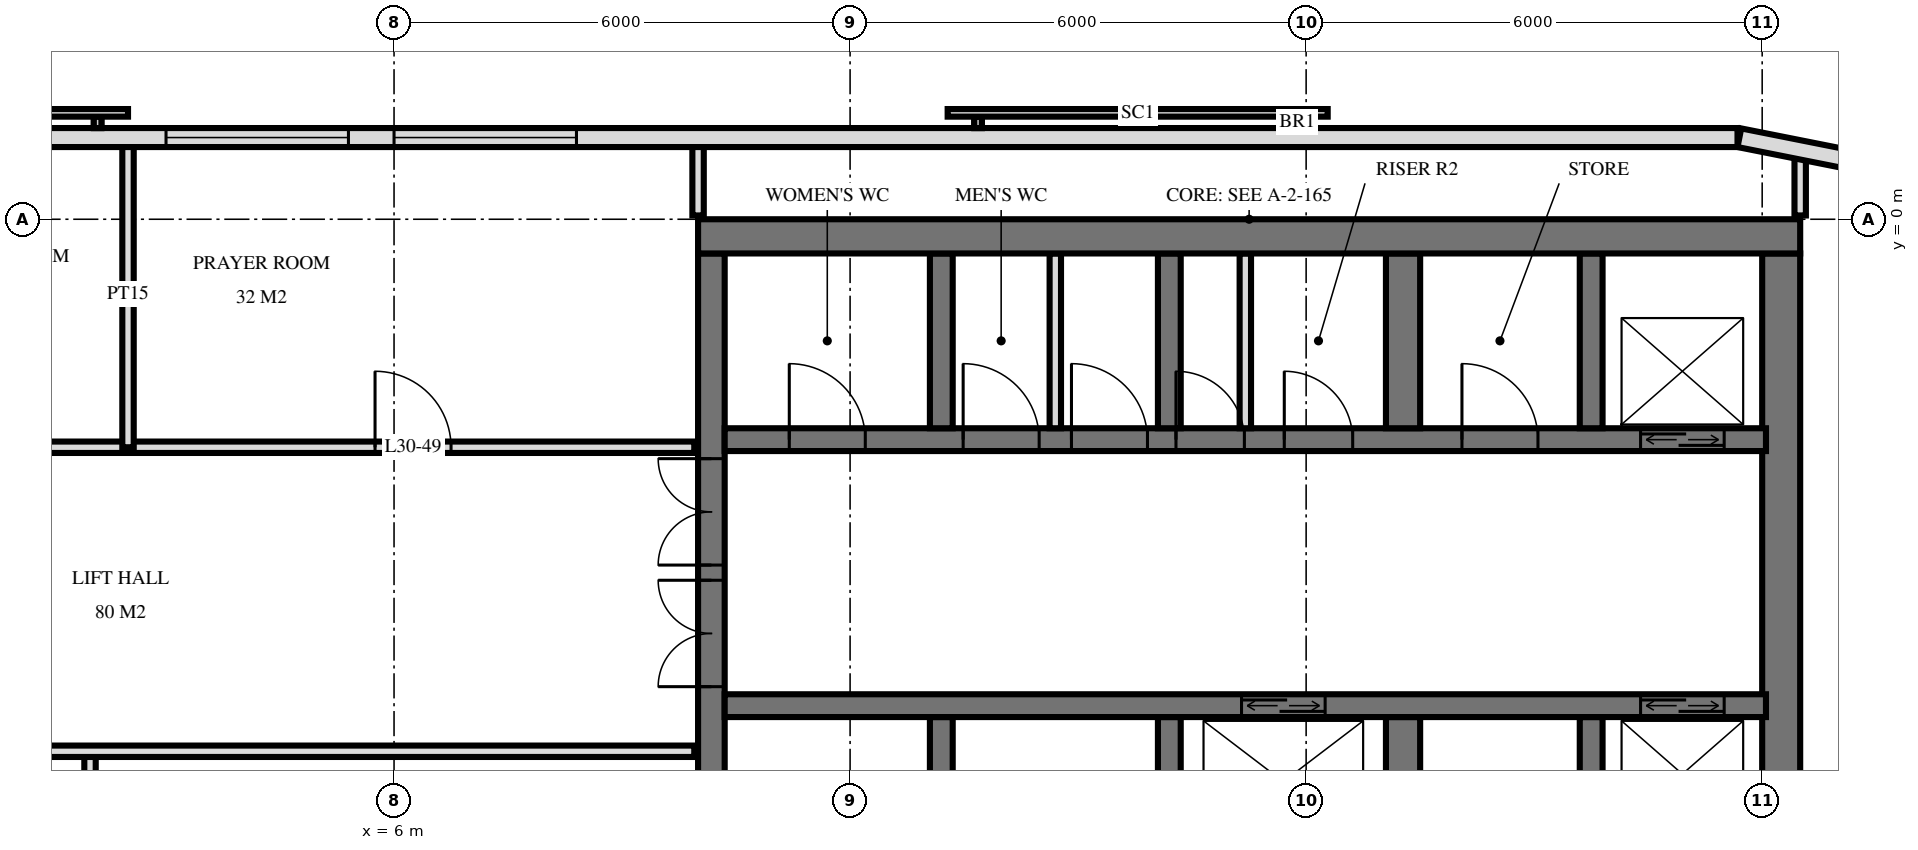
"""IFC4 building model, lengths in metres.
Left out: names, types, materials, properties, quantities, classifications, styles, units other than length and angle.
Written with IfcOpenShell. Run it as: python <this file> out.ifc"""

import sys

from ifc_helpers import new_model, si_unit, direction, frame, frame_2d, origin, place, context, subcontext, project, spatial, rectangle, extrude, element, fill, save


model = new_model("IFC4")
c1 = context("Model", 3, precision=1e-05, world=origin(), true_north=direction((0.0, 1.0)))
c2 = subcontext(c1, "Body", "Model", "MODEL_VIEW")
j1 = project(units=[si_unit("LENGTHUNIT", "METRE"), si_unit("PLANEANGLEUNIT", "RADIAN")], contexts=[c1])
p1 = place(None, origin())
s1 = spatial("IfcSite", under=j1, at=p1, CompositionType="ELEMENT")
p2 = place(p1, origin())
s2 = spatial("IfcBuilding", under=s1, at=p2, CompositionType="ELEMENT")
p3 = place(p2, frame((0.0, 0.0, 120.0)))
s3 = spatial("IfcBuildingStorey", under=s2, at=p3, CompositionType="ELEMENT", Elevation=120.0)
p4 = place(p3, frame((10.0, -0.225, 0.0), z_axis=(0.0, 0.0, 1.0), x_axis=(1.0, 0.0, 0.0)))
e1 = element("IfcWall", 1, at=p4, inside=s3, PredefinedType="SHEAR", context=c2, shape_type="SweptSolid", body=[
    extrude(rectangle(XDim=14.5, YDim=0.45, at=frame_2d((7.25, 0.0))), origin(), (0.0, 0.0, 1.0), 3.6),
])
p5 = place(p3, frame((10.175, -14.55, 0.0), z_axis=(0.0, 0.0, 1.0), x_axis=(0.0, 1.0, 0.0)))
e2 = element("IfcWall", 2, at=p5, inside=s3, PredefinedType="SHEAR", context=c2, shape_type="SweptSolid", body=[
    extrude(rectangle(XDim=14.1, YDim=0.35, at=frame_2d((7.05, 0.0))), origin(), (0.0, 0.0, 1.0), 3.6),
])
p6 = place(p5, frame((8.4, 0.0, 0.0)))
e3 = element("IfcOpeningElement", 3, at=p6, cuts=e2, PredefinedType="OPENING", context=c2, shape_type="SweptSolid", body=[
    extrude(rectangle(XDim=1.4, YDim=2.4, at=frame_2d((0.7, 1.2))), frame((0.0, 0.185, 0.0), z_axis=(0.0, -1.0, 0.0), x_axis=(1.0, 0.0, 0.0)), (0.0, 0.0, 1.0), 0.37),
])
p7 = place(p5, frame((10.0, 0.0, 0.0)))
e4 = element("IfcOpeningElement", 4, at=p7, cuts=e2, PredefinedType="OPENING", context=c2, shape_type="SweptSolid", body=[
    extrude(rectangle(XDim=1.4, YDim=2.4, at=frame_2d((0.7, 1.2))), frame((0.0, 0.185, 0.0), z_axis=(0.0, -1.0, 0.0), x_axis=(1.0, 0.0, 0.0)), (0.0, 0.0, 1.0), 0.37),
])
p8 = place(p5, frame((4.0, 0.0, 0.0)))
e5 = element("IfcOpeningElement", 5, at=p8, cuts=e2, PredefinedType="OPENING", context=c2, shape_type="SweptSolid", body=[
    extrude(rectangle(XDim=1.2, YDim=2.1, at=frame_2d((0.6, 1.05))), frame((0.0, 0.185, 0.0), z_axis=(0.0, -1.0, 0.0), x_axis=(1.0, 0.0, 0.0)), (0.0, 0.0, 1.0), 0.37),
])
p9 = place(p3, frame((24.25, -14.55, 0.0), z_axis=(0.0, 0.0, 1.0), x_axis=(0.0, 1.0, 0.0)))
e6 = element("IfcWall", 6, at=p9, inside=s3, PredefinedType="SHEAR", context=c2, shape_type="SweptSolid", body=[
    extrude(rectangle(XDim=14.1, YDim=0.5, at=frame_2d((7.05, 0.0))), origin(), (0.0, 0.0, 1.0), 3.6),
])
p10 = place(p3, frame((10.35, -2.9, 0.0), z_axis=(0.0, 0.0, 1.0), x_axis=(1.0, 0.0, 0.0)))
e7 = element("IfcWall", 7, at=p10, inside=s3, PredefinedType="SHEAR", context=c2, shape_type="SweptSolid", body=[
    extrude(rectangle(XDim=13.7, YDim=0.3, at=frame_2d((6.85, 0.0))), origin(), (0.0, 0.0, 1.0), 3.6),
])
p11 = place(p10, frame((12.05, 0.0, 0.0)))
e8 = element("IfcOpeningElement", 8, at=p11, cuts=e7, PredefinedType="OPENING", context=c2, shape_type="SweptSolid", body=[
    extrude(rectangle(XDim=1.1, YDim=2.1, at=frame_2d((0.55, 1.05))), frame((0.0, 0.16, 0.0), z_axis=(0.0, -1.0, 0.0), x_axis=(1.0, 0.0, 0.0)), (0.0, 0.0, 1.0), 0.32),
])
p12 = place(p10, frame((5.938, 0.0, 0.0)))
e9 = element("IfcOpeningElement", 9, at=p12, cuts=e7, PredefinedType="OPENING", context=c2, shape_type="SweptSolid", body=[
    extrude(rectangle(XDim=0.9, YDim=2.1, at=frame_2d((0.45, 1.05))), frame((0.0, 0.16, 0.0), z_axis=(0.0, -1.0, 0.0), x_axis=(1.0, 0.0, 0.0)), (0.0, 0.0, 1.0), 0.32),
])
p13 = place(p10, frame((7.363, 0.0, 0.0)))
e10 = element("IfcOpeningElement", 10, at=p13, cuts=e7, PredefinedType="OPENING", context=c2, shape_type="SweptSolid", body=[
    extrude(rectangle(XDim=0.9, YDim=2.1, at=frame_2d((0.45, 1.05))), frame((0.0, 0.16, 0.0), z_axis=(0.0, -1.0, 0.0), x_axis=(1.0, 0.0, 0.0)), (0.0, 0.0, 1.0), 0.32),
])
p14 = place(p10, frame((0.85, 0.0, 0.0)))
e11 = element("IfcOpeningElement", 11, at=p14, cuts=e7, PredefinedType="OPENING", context=c2, shape_type="SweptSolid", body=[
    extrude(rectangle(XDim=1.0, YDim=2.1, at=frame_2d((0.5, 1.05))), frame((0.0, 0.16, 0.0), z_axis=(0.0, -1.0, 0.0), x_axis=(1.0, 0.0, 0.0)), (0.0, 0.0, 1.0), 0.32),
])
p15 = place(p10, frame((3.137, 0.0, 0.0)))
e12 = element("IfcOpeningElement", 12, at=p15, cuts=e7, PredefinedType="OPENING", context=c2, shape_type="SweptSolid", body=[
    extrude(rectangle(XDim=1.0, YDim=2.1, at=frame_2d((0.5, 1.05))), frame((0.0, 0.16, 0.0), z_axis=(0.0, -1.0, 0.0), x_axis=(1.0, 0.0, 0.0)), (0.0, 0.0, 1.0), 0.32),
])
p16 = place(p10, frame((4.562, 0.0, 0.0)))
e13 = element("IfcOpeningElement", 13, at=p16, cuts=e7, PredefinedType="OPENING", context=c2, shape_type="SweptSolid", body=[
    extrude(rectangle(XDim=1.0, YDim=2.1, at=frame_2d((0.5, 1.05))), frame((0.0, 0.16, 0.0), z_axis=(0.0, -1.0, 0.0), x_axis=(1.0, 0.0, 0.0)), (0.0, 0.0, 1.0), 0.32),
])
p17 = place(p10, frame((9.7, 0.0, 0.0)))
e14 = element("IfcOpeningElement", 14, at=p17, cuts=e7, PredefinedType="OPENING", context=c2, shape_type="SweptSolid", body=[
    extrude(rectangle(XDim=1.0, YDim=2.1, at=frame_2d((0.5, 1.05))), frame((0.0, 0.16, 0.0), z_axis=(0.0, -1.0, 0.0), x_axis=(1.0, 0.0, 0.0)), (0.0, 0.0, 1.0), 0.32),
])
p18 = place(p3, frame((10.35, -6.4, 0.0), z_axis=(0.0, 0.0, 1.0), x_axis=(1.0, 0.0, 0.0)))
e15 = element("IfcWall", 15, at=p18, inside=s3, PredefinedType="SHEAR", context=c2, shape_type="SweptSolid", body=[
    extrude(rectangle(XDim=13.7, YDim=0.3, at=frame_2d((6.85, 0.0))), origin(), (0.0, 0.0, 1.0), 3.6),
])
p19 = place(p18, frame((12.05, 0.0, 0.0)))
e16 = element("IfcOpeningElement", 16, at=p19, cuts=e15, PredefinedType="OPENING", context=c2, shape_type="SweptSolid", body=[
    extrude(rectangle(XDim=1.1, YDim=2.1, at=frame_2d((0.55, 1.05))), frame((0.0, 0.16, 0.0), z_axis=(0.0, -1.0, 0.0), x_axis=(1.0, 0.0, 0.0)), (0.0, 0.0, 1.0), 0.32),
])
p20 = place(p18, frame((6.8, 0.0, 0.0)))
e17 = element("IfcOpeningElement", 17, at=p20, cuts=e15, PredefinedType="OPENING", context=c2, shape_type="SweptSolid", body=[
    extrude(rectangle(XDim=1.1, YDim=2.1, at=frame_2d((0.55, 1.05))), frame((0.0, 0.16, 0.0), z_axis=(0.0, -1.0, 0.0), x_axis=(1.0, 0.0, 0.0)), (0.0, 0.0, 1.0), 0.32),
])
for number, where, z_axis, x_axis in (
    (18, (13.2, -2.75, 0.0), (0.0, 0.0, 1.0), (0.0, 1.0, 0.0)),
    (19, (13.2, -8.85, 0.0), (0.0, 0.0, 1.0), (0.0, 1.0, 0.0)),
    (20, (16.2, -2.75, 0.0), (0.0, 0.0, 1.0), (0.0, 1.0, 0.0)),
    (21, (16.2, -8.85, 0.0), (0.0, 0.0, 1.0), (0.0, 1.0, 0.0)),
):
    element("IfcWall", number, at=place(p3, frame(where, z_axis=z_axis, x_axis=x_axis)), inside=s3, PredefinedType="SHEAR", context=c2, shape_type="SweptSolid", body=[
        extrude(rectangle(XDim=2.3, YDim=0.3, at=frame_2d((1.15, 0.0))), origin(), (0.0, 0.0, 1.0), 3.6),
    ])
for number, where, z_axis, x_axis in (
    (22, (19.275, -2.75, 0.0), (0.0, 0.0, 1.0), (0.0, 1.0, 0.0)),
    (23, (19.275, -8.85, 0.0), (0.0, 0.0, 1.0), (0.0, 1.0, 0.0)),
):
    element("IfcWall", number, at=place(p3, frame(where, z_axis=z_axis, x_axis=x_axis)), inside=s3, PredefinedType="SHEAR", context=c2, shape_type="SweptSolid", body=[
        extrude(rectangle(XDim=2.3, YDim=0.45, at=frame_2d((1.15, 0.0))), origin(), (0.0, 0.0, 1.0), 3.6),
    ])
for number, where, z_axis, x_axis in (
    (24, (21.75, -2.75, 0.0), (0.0, 0.0, 1.0), (0.0, 1.0, 0.0)),
    (25, (21.75, -8.85, 0.0), (0.0, 0.0, 1.0), (0.0, 1.0, 0.0)),
):
    element("IfcWall", number, at=place(p3, frame(where, z_axis=z_axis, x_axis=x_axis)), inside=s3, PredefinedType="SHEAR", context=c2, shape_type="SweptSolid", body=[
        extrude(rectangle(XDim=2.3, YDim=0.3, at=frame_2d((1.15, 0.0))), origin(), (0.0, 0.0, 1.0), 3.6),
    ])
p21 = place(p3, frame((25.349, 0.745, 0.0), z_axis=(0.0, 0.0, 1.0), x_axis=(-0.980803419081, 0.194999110559, 0.0)))
e26 = element("IfcWall", 26, at=p21, inside=s3, PredefinedType="SOLIDWALL", context=c2, shape_type="SweptSolid", body=[
    extrude(rectangle(XDim=1.681, YDim=0.25, at=frame_2d((0.841, 0.0))), origin(), (0.0, 0.0, 1.0), 3.32),
])
p22 = place(p3, frame((23.675, 1.075, 0.0), z_axis=(0.0, 0.0, 1.0), x_axis=(-1.0, 0.0, 0.0)))
e27 = element("IfcWall", 27, at=p22, inside=s3, PredefinedType="SOLIDWALL", context=c2, shape_type="SweptSolid", body=[
    extrude(rectangle(XDim=47.351, YDim=0.25, at=frame_2d((23.675, 0.0))), origin(), (0.0, 0.0, 1.0), 3.32),
])
p23 = place(p22, frame((15.275, 0.0, 0.3)))
e28 = element("IfcOpeningElement", 28, at=p23, cuts=e27, PredefinedType="OPENING", context=c2, shape_type="SweptSolid", body=[
    extrude(rectangle(XDim=2.4, YDim=2.1, at=frame_2d((1.2, 1.05))), frame((0.0, 0.135, 0.0), z_axis=(0.0, -1.0, 0.0), x_axis=(1.0, 0.0, 0.0)), (0.0, 0.0, 1.0), 0.27),
])
p24 = place(p22, frame((18.275, 0.0, 0.3)))
e29 = element("IfcOpeningElement", 29, at=p24, cuts=e27, PredefinedType="OPENING", context=c2, shape_type="SweptSolid", body=[
    extrude(rectangle(XDim=2.4, YDim=2.1, at=frame_2d((1.2, 1.05))), frame((0.0, 0.135, 0.0), z_axis=(0.0, -1.0, 0.0), x_axis=(1.0, 0.0, 0.0)), (0.0, 0.0, 1.0), 0.27),
])
p25 = place(p22, frame((24.275, 0.0, 0.3)))
e30 = element("IfcOpeningElement", 30, at=p25, cuts=e27, PredefinedType="OPENING", context=c2, shape_type="SweptSolid", body=[
    extrude(rectangle(XDim=2.4, YDim=2.1, at=frame_2d((1.2, 1.05))), frame((0.0, 0.135, 0.0), z_axis=(0.0, -1.0, 0.0), x_axis=(1.0, 0.0, 0.0)), (0.0, 0.0, 1.0), 0.27),
])
for number, where, z_axis, x_axis in (
    (31, (17.2, -2.75, 0.0), (0.0, 0.0, 1.0), (0.0, 1.0, 0.0)),
    (32, (14.7, -2.75, 0.0), (0.0, 0.0, 1.0), (0.0, 1.0, 0.0)),
):
    element("IfcWall", number, at=place(p3, frame(where, z_axis=z_axis, x_axis=x_axis)), inside=s3, PredefinedType="PARTITIONING", context=c2, shape_type="SweptSolid", body=[
        extrude(rectangle(XDim=2.3, YDim=0.15, at=frame_2d((1.15, 0.0))), origin(), (0.0, 0.0, 1.0), 3.3),
    ])
p26 = place(p3, frame((24.5, 0.05, 0.0), z_axis=(0.0, 0.0, 1.0), x_axis=(0.0, 1.0, 0.0)))
e33 = element("IfcWall", 33, at=p26, inside=s3, PredefinedType="PARTITIONING", context=c2, shape_type="SweptSolid", body=[
    extrude(rectangle(XDim=0.807, YDim=0.15, at=frame_2d((0.404, 0.0))), origin(), (0.0, 0.0, 1.0), 3.32),
])
p27 = place(p3, frame((10.0, 0.05, 0.0), z_axis=(0.0, 0.0, 1.0), x_axis=(0.0, 1.0, 0.0)))
e34 = element("IfcWall", 34, at=p27, inside=s3, PredefinedType="PARTITIONING", context=c2, shape_type="SweptSolid", body=[
    extrude(rectangle(XDim=0.97, YDim=0.15, at=frame_2d((0.485, 0.0))), origin(), (0.0, 0.0, 1.0), 3.32),
])
p28 = place(p3, frame((2.5, -3.0, 0.0), z_axis=(0.0, 0.0, 1.0), x_axis=(0.0, 1.0, 0.0)))
e35 = element("IfcWall", 35, at=p28, inside=s3, PredefinedType="PARTITIONING", context=c2, shape_type="SweptSolid", body=[
    extrude(rectangle(XDim=4.02, YDim=0.15, at=frame_2d((2.01, 0.0))), origin(), (0.0, 0.0, 1.0), 3.32),
])
p29 = place(p3, frame((2.0, -11.0, 0.0), z_axis=(0.0, 0.0, 1.0), x_axis=(0.0, 1.0, 0.0)))
e36 = element("IfcWall", 36, at=p29, inside=s3, PredefinedType="PARTITIONING", context=c2, shape_type="SweptSolid", body=[
    extrude(rectangle(XDim=4.0, YDim=0.15, at=frame_2d((2.0, 0.0))), origin(), (0.0, 0.0, 1.0), 3.32),
])
p30 = place(p3, frame((-9.95, -7.0, 0.0), z_axis=(0.0, 0.0, 1.0), x_axis=(1.0, 0.0, 0.0)))
e37 = element("IfcWall", 37, at=p30, inside=s3, PredefinedType="PARTITIONING", context=c2, shape_type="SweptSolid", body=[
    extrude(rectangle(XDim=19.9, YDim=0.15, at=frame_2d((9.95, 0.0))), origin(), (0.0, 0.0, 1.0), 3.32),
])
p31 = place(p30, frame((9.45, 0.0, 0.0)))
e38 = element("IfcOpeningElement", 38, at=p31, cuts=e37, PredefinedType="OPENING", context=c2, shape_type="SweptSolid", body=[
    extrude(rectangle(XDim=1.0, YDim=2.1, at=frame_2d((0.5, 1.05))), frame((0.0, 0.085, 0.0), z_axis=(0.0, -1.0, 0.0), x_axis=(1.0, 0.0, 0.0)), (0.0, 0.0, 1.0), 0.17),
])
p32 = place(p30, frame((3.45, 0.0, 0.0)))
e39 = element("IfcOpeningElement", 39, at=p32, cuts=e37, PredefinedType="OPENING", context=c2, shape_type="SweptSolid", body=[
    extrude(rectangle(XDim=1.0, YDim=2.1, at=frame_2d((0.5, 1.05))), frame((0.0, 0.085, 0.0), z_axis=(0.0, -1.0, 0.0), x_axis=(1.0, 0.0, 0.0)), (0.0, 0.0, 1.0), 0.17),
])
p33 = place(p3, frame((-9.95, -3.0, 0.0), z_axis=(0.0, 0.0, 1.0), x_axis=(1.0, 0.0, 0.0)))
e40 = element("IfcWall", 40, at=p33, inside=s3, PredefinedType="PARTITIONING", context=c2, shape_type="SweptSolid", body=[
    extrude(rectangle(XDim=19.9, YDim=0.15, at=frame_2d((9.95, 0.0))), origin(), (0.0, 0.0, 1.0), 3.32),
])
p34 = place(p33, frame((0.95, 0.0, 0.0)))
e41 = element("IfcOpeningElement", 41, at=p34, cuts=e40, PredefinedType="OPENING", context=c2, shape_type="SweptSolid", body=[
    extrude(rectangle(XDim=1.0, YDim=2.1, at=frame_2d((0.5, 1.05))), frame((0.0, 0.085, 0.0), z_axis=(0.0, -1.0, 0.0), x_axis=(1.0, 0.0, 0.0)), (0.0, 0.0, 1.0), 0.17),
])
p35 = place(p33, frame((3.7, 0.0, 0.0)))
e42 = element("IfcOpeningElement", 42, at=p35, cuts=e40, PredefinedType="OPENING", context=c2, shape_type="SweptSolid", body=[
    extrude(rectangle(XDim=1.0, YDim=2.1, at=frame_2d((0.5, 1.05))), frame((0.0, 0.085, 0.0), z_axis=(0.0, -1.0, 0.0), x_axis=(1.0, 0.0, 0.0)), (0.0, 0.0, 1.0), 0.17),
])
p36 = place(p33, frame((8.45, 0.0, 0.0)))
e43 = element("IfcOpeningElement", 43, at=p36, cuts=e40, PredefinedType="OPENING", context=c2, shape_type="SweptSolid", body=[
    extrude(rectangle(XDim=1.0, YDim=2.1, at=frame_2d((0.5, 1.05))), frame((0.0, 0.085, 0.0), z_axis=(0.0, -1.0, 0.0), x_axis=(1.0, 0.0, 0.0)), (0.0, 0.0, 1.0), 0.17),
])
p37 = place(p33, frame((15.7, 0.0, 0.0)))
e44 = element("IfcOpeningElement", 44, at=p37, cuts=e40, PredefinedType="OPENING", context=c2, shape_type="SweptSolid", body=[
    extrude(rectangle(XDim=1.0, YDim=2.1, at=frame_2d((0.5, 1.05))), frame((0.0, 0.085, 0.0), z_axis=(0.0, -1.0, 0.0), x_axis=(1.0, 0.0, 0.0)), (0.0, 0.0, 1.0), 0.17),
])
p38 = place(p23, origin())
e45 = element("IfcWindow", 45, at=p38, inside=s3, PartitioningType="SINGLE_PANEL", PredefinedType="WINDOW", context=c2, shape_type="SweptSolid", body=[
    extrude(rectangle(XDim=2.4, YDim=2.1, at=frame_2d((1.2, 1.05))), frame((0.0, 0.03, 0.0), z_axis=(0.0, -1.0, 0.0), x_axis=(1.0, 0.0, 0.0)), (0.0, 0.0, 1.0), 0.06),
])
fill(e28, e45)
p39 = place(p24, origin())
e46 = element("IfcWindow", 46, at=p39, inside=s3, PartitioningType="SINGLE_PANEL", PredefinedType="WINDOW", context=c2, shape_type="SweptSolid", body=[
    extrude(rectangle(XDim=2.4, YDim=2.1, at=frame_2d((1.2, 1.05))), frame((0.0, 0.03, 0.0), z_axis=(0.0, -1.0, 0.0), x_axis=(1.0, 0.0, 0.0)), (0.0, 0.0, 1.0), 0.06),
])
fill(e29, e46)
p40 = place(p11, origin())
e47 = element("IfcDoor", 47, at=p40, inside=s3, OperationType="DOUBLE_DOOR_SLIDING", PredefinedType="USERDEFINED", context=c2, shape_type="SweptSolid", body=[
    extrude(rectangle(XDim=1.1, YDim=2.1, at=frame_2d((0.55, 1.05))), frame((0.0, 0.025, 0.0), z_axis=(0.0, -1.0, 0.0), x_axis=(1.0, 0.0, 0.0)), (0.0, 0.0, 1.0), 0.05),
])
fill(e8, e47)
p41 = place(p19, origin())
e48 = element("IfcDoor", 48, at=p41, inside=s3, OperationType="DOUBLE_DOOR_SLIDING", PredefinedType="USERDEFINED", context=c2, shape_type="SweptSolid", body=[
    extrude(rectangle(XDim=1.1, YDim=2.1, at=frame_2d((0.55, 1.05))), frame((0.0, 0.025, 0.0), z_axis=(0.0, -1.0, 0.0), x_axis=(1.0, 0.0, 0.0)), (0.0, 0.0, 1.0), 0.05),
])
fill(e16, e48)
p42 = place(p20, origin())
e49 = element("IfcDoor", 49, at=p42, inside=s3, OperationType="DOUBLE_DOOR_SLIDING", PredefinedType="USERDEFINED", context=c2, shape_type="SweptSolid", body=[
    extrude(rectangle(XDim=1.1, YDim=2.1, at=frame_2d((0.55, 1.05))), frame((0.0, 0.025, 0.0), z_axis=(0.0, -1.0, 0.0), x_axis=(1.0, 0.0, 0.0)), (0.0, 0.0, 1.0), 0.05),
])
fill(e17, e49)
p43 = place(p6, origin())
e50 = element("IfcDoor", 50, at=p43, inside=s3, OperationType="DOUBLE_DOOR_SINGLE_SWING", PredefinedType="DOOR", context=c2, shape_type="SweptSolid", body=[
    extrude(rectangle(XDim=1.4, YDim=2.4, at=frame_2d((0.7, 1.2))), frame((0.0, 0.025, 0.0), z_axis=(0.0, -1.0, 0.0), x_axis=(1.0, 0.0, 0.0)), (0.0, 0.0, 1.0), 0.05),
])
fill(e3, e50)
p44 = place(p7, origin())
e51 = element("IfcDoor", 51, at=p44, inside=s3, OperationType="DOUBLE_DOOR_SINGLE_SWING", PredefinedType="DOOR", context=c2, shape_type="SweptSolid", body=[
    extrude(rectangle(XDim=1.4, YDim=2.4, at=frame_2d((0.7, 1.2))), frame((0.0, 0.025, 0.0), z_axis=(0.0, -1.0, 0.0), x_axis=(1.0, 0.0, 0.0)), (0.0, 0.0, 1.0), 0.05),
])
fill(e4, e51)
p45 = place(p12, origin())
e52 = element("IfcDoor", 52, at=p45, inside=s3, OperationType="SINGLE_SWING_RIGHT", PredefinedType="DOOR", context=c2, shape_type="SweptSolid", body=[
    extrude(rectangle(XDim=0.9, YDim=2.1, at=frame_2d((0.45, 1.05))), frame((0.0, 0.025, 0.0), z_axis=(0.0, -1.0, 0.0), x_axis=(1.0, 0.0, 0.0)), (0.0, 0.0, 1.0), 0.05),
])
fill(e9, e52)
p46 = place(p13, origin())
e53 = element("IfcDoor", 53, at=p46, inside=s3, OperationType="SINGLE_SWING_RIGHT", PredefinedType="DOOR", context=c2, shape_type="SweptSolid", body=[
    extrude(rectangle(XDim=0.9, YDim=2.1, at=frame_2d((0.45, 1.05))), frame((0.0, 0.025, 0.0), z_axis=(0.0, -1.0, 0.0), x_axis=(1.0, 0.0, 0.0)), (0.0, 0.0, 1.0), 0.05),
])
fill(e10, e53)
p47 = place(p14, origin())
e54 = element("IfcDoor", 54, at=p47, inside=s3, OperationType="SINGLE_SWING_RIGHT", PredefinedType="DOOR", context=c2, shape_type="SweptSolid", body=[
    extrude(rectangle(XDim=1.0, YDim=2.1, at=frame_2d((0.5, 1.05))), frame((0.0, 0.025, 0.0), z_axis=(0.0, -1.0, 0.0), x_axis=(1.0, 0.0, 0.0)), (0.0, 0.0, 1.0), 0.05),
])
fill(e11, e54)
p48 = place(p15, origin())
e55 = element("IfcDoor", 55, at=p48, inside=s3, OperationType="SINGLE_SWING_RIGHT", PredefinedType="DOOR", context=c2, shape_type="SweptSolid", body=[
    extrude(rectangle(XDim=1.0, YDim=2.1, at=frame_2d((0.5, 1.05))), frame((0.0, 0.025, 0.0), z_axis=(0.0, -1.0, 0.0), x_axis=(1.0, 0.0, 0.0)), (0.0, 0.0, 1.0), 0.05),
])
fill(e12, e55)
p49 = place(p16, origin())
e56 = element("IfcDoor", 56, at=p49, inside=s3, OperationType="SINGLE_SWING_RIGHT", PredefinedType="DOOR", context=c2, shape_type="SweptSolid", body=[
    extrude(rectangle(XDim=1.0, YDim=2.1, at=frame_2d((0.5, 1.05))), frame((0.0, 0.025, 0.0), z_axis=(0.0, -1.0, 0.0), x_axis=(1.0, 0.0, 0.0)), (0.0, 0.0, 1.0), 0.05),
])
fill(e13, e56)
p50 = place(p17, origin())
e57 = element("IfcDoor", 57, at=p50, inside=s3, OperationType="SINGLE_SWING_RIGHT", PredefinedType="DOOR", context=c2, shape_type="SweptSolid", body=[
    extrude(rectangle(XDim=1.0, YDim=2.1, at=frame_2d((0.5, 1.05))), frame((0.0, 0.025, 0.0), z_axis=(0.0, -1.0, 0.0), x_axis=(1.0, 0.0, 0.0)), (0.0, 0.0, 1.0), 0.05),
])
fill(e14, e57)
p51 = place(p37, origin())
e58 = element("IfcDoor", 58, at=p51, inside=s3, OperationType="SINGLE_SWING_RIGHT", PredefinedType="DOOR", context=c2, shape_type="SweptSolid", body=[
    extrude(rectangle(XDim=1.0, YDim=2.1, at=frame_2d((0.5, 1.05))), frame((0.0, 0.025, 0.0), z_axis=(0.0, -1.0, 0.0), x_axis=(1.0, 0.0, 0.0)), (0.0, 0.0, 1.0), 0.05),
])
fill(e44, e58)
save(model, sys.argv[1])
